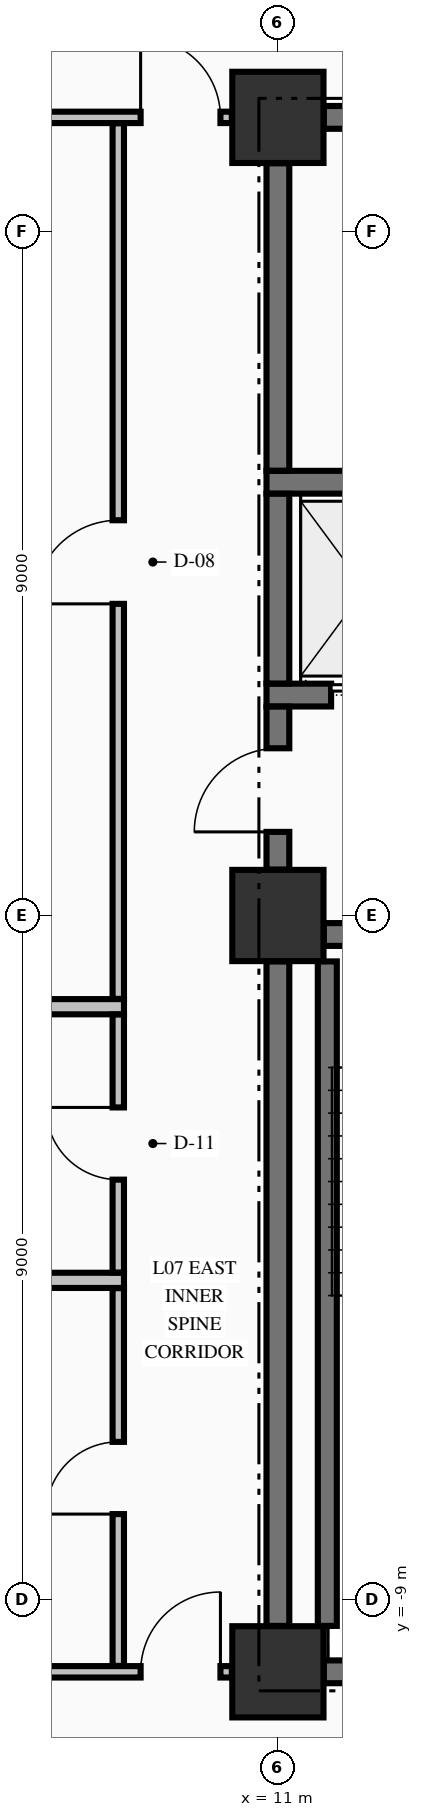
"""IFC4 building model, lengths in metres.
Left out: names, types, materials, properties, quantities, classifications, styles, units other than length and angle.
Written with IfcOpenShell. Run it as: python <this file> out.ifc"""

import sys

from ifc_helpers import new_model, si_unit, direction, frame, frame_2d, origin, origin_2d, place, context, subcontext, project, spatial, rectangle, extrude, element, fill, save


model = new_model("IFC4")
c1 = context("Model", 3, precision=1e-05, world=origin(), true_north=direction((0.0, 1.0)))
c2 = subcontext(c1, "Body", "Model", "MODEL_VIEW")
j1 = project(units=[si_unit("LENGTHUNIT", "METRE"), si_unit("PLANEANGLEUNIT", "RADIAN")], contexts=[c1])
p1 = place(None, origin())
s1 = spatial("IfcSite", under=j1, at=p1, CompositionType="ELEMENT")
p2 = place(p1, origin())
s2 = spatial("IfcBuilding", under=s1, at=p2, CompositionType="ELEMENT")
p3 = place(p2, frame((0.0, 0.0, 34.34)))
s3 = spatial("IfcBuildingStorey", under=s2, at=p3, CompositionType="ELEMENT", Elevation=34.34)
for number, where, z_axis, x_axis in (
    (1, (11.0, -9.95, -0.3), (0.0, 0.0, 1.0), (1.0, 0.0, 0.0)),
    (2, (11.0, 0.0, -0.3), (0.0, 0.0, 1.0), (1.0, 0.0, 0.0)),
    (3, (11.0, 10.5, -0.3), (0.0, 0.0, 1.0), (1.0, 0.0, 0.0)),
):
    element("IfcColumn", number, at=place(p3, frame(where, z_axis=z_axis, x_axis=x_axis)), inside=s3, PredefinedType="COLUMN", context=c2, shape_type="SweptSolid", body=[
        extrude(rectangle(XDim=1.2, YDim=1.2, at=origin_2d()), origin(), (0.0, 0.0, 1.0), 3.62),
    ])
p4 = place(p3, frame((11.604, -9.95, 0.0), z_axis=(0.0, 0.0, 1.0), x_axis=(1.0, 0.0, 0.0)))
e4 = element("IfcWall", 4, at=p4, inside=s3, PredefinedType="SHEAR", context=c2, shape_type="SweptSolid", body=[
    extrude(rectangle(XDim=3.096, YDim=0.3, at=frame_2d((1.548, 0.0))), origin(), (0.0, 0.0, 1.0), 3.32),
])
p5 = place(p3, frame((11.604, -0.25, 0.0), z_axis=(0.0, 0.0, 1.0), x_axis=(1.0, 0.0, 0.0)))
e5 = element("IfcWall", 5, at=p5, inside=s3, PredefinedType="SHEAR", context=c2, shape_type="SweptSolid", body=[
    extrude(rectangle(XDim=3.271, YDim=0.3, at=frame_2d((1.635, 0.0))), origin(), (0.0, 0.0, 1.0), 3.32),
])
p6 = place(p5, frame((0.996, 0.0, 0.0)))
e6 = element("IfcOpeningElement", 6, at=p6, cuts=e5, PredefinedType="OPENING", context=c2, shape_type="SweptSolid", body=[
    extrude(rectangle(XDim=1.1, YDim=2.15, at=frame_2d((0.55, 1.075))), frame((0.0, 0.16, 0.0), z_axis=(0.0, -1.0, 0.0), x_axis=(1.0, 0.0, 0.0)), (0.0, 0.0, 1.0), 0.32),
])
p7 = place(p3, frame((10.85, 2.9, 0.0), z_axis=(0.0, 0.0, 1.0), x_axis=(1.0, 0.0, 0.0)))
e7 = element("IfcWall", 7, at=p7, inside=s3, PredefinedType="SHEAR", context=c2, shape_type="SweptSolid", body=[
    extrude(rectangle(XDim=4.025, YDim=0.3, at=frame_2d((2.012, 0.0))), origin(), (0.0, 0.0, 1.0), 3.32),
])
p8 = place(p7, frame((0.85, 0.0, 0.0)))
e8 = element("IfcOpeningElement", 8, at=p8, cuts=e7, PredefinedType="OPENING", context=c2, shape_type="SweptSolid", body=[
    extrude(rectangle(XDim=1.1, YDim=2.2, at=frame_2d((0.55, 1.1))), frame((0.0, 0.16, 0.0), z_axis=(0.0, -1.0, 0.0), x_axis=(1.0, 0.0, 0.0)), (0.0, 0.0, 1.0), 0.32),
])
p9 = place(p3, frame((10.85, 5.7, 0.0), z_axis=(0.0, 0.0, 1.0), x_axis=(1.0, 0.0, 0.0)))
e9 = element("IfcWall", 9, at=p9, inside=s3, PredefinedType="SHEAR", context=c2, shape_type="SweptSolid", body=[
    extrude(rectangle(XDim=4.025, YDim=0.3, at=frame_2d((2.012, 0.0))), origin(), (0.0, 0.0, 1.0), 3.32),
])
p10 = place(p3, frame((11.604, 10.5, 0.0), z_axis=(0.0, 0.0, 1.0), x_axis=(1.0, 0.0, 0.0)))
e10 = element("IfcWall", 10, at=p10, inside=s3, PredefinedType="SHEAR", context=c2, shape_type="SweptSolid", body=[
    extrude(rectangle(XDim=3.096, YDim=0.3, at=frame_2d((1.548, 0.0))), origin(), (0.0, 0.0, 1.0), 3.32),
])
p11 = place(p10, frame((1.371, 0.0, 0.0)))
e11 = element("IfcOpeningElement", 11, at=p11, cuts=e10, PredefinedType="OPENING", context=c2, shape_type="SweptSolid", body=[
    extrude(rectangle(XDim=0.95, YDim=2.15, at=frame_2d((0.475, 1.075))), frame((0.0, 0.16, 0.0), z_axis=(0.0, -1.0, 0.0), x_axis=(1.0, 0.0, 0.0)), (0.0, 0.0, 1.0), 0.32),
])
p12 = place(p3, frame((-10.394, -9.95, 0.0), z_axis=(0.0, 0.0, 1.0), x_axis=(1.0, 0.0, 0.0)))
e12 = element("IfcWall", 12, at=p12, inside=s3, PredefinedType="PARTITIONING", context=c2, shape_type="SweptSolid", body=[
    extrude(rectangle(XDim=20.788, YDim=0.15, at=frame_2d((10.394, 0.0))), origin(), (0.0, 0.0, 1.0), 3.32),
])
p13 = place(p12, frame((0.15, 0.0, 0.0)))
e13 = element("IfcOpeningElement", 13, at=p13, cuts=e12, PredefinedType="OPENING", context=c2, shape_type="SweptSolid", body=[
    extrude(rectangle(XDim=1.05, YDim=2.15, at=frame_2d((0.525, 1.075))), frame((0.0, 0.085, 0.0), z_axis=(0.0, -1.0, 0.0), x_axis=(1.0, 0.0, 0.0)), (0.0, 0.0, 1.0), 0.17),
])
p14 = place(p12, frame((19.588, 0.0, 0.0)))
e14 = element("IfcOpeningElement", 14, at=p14, cuts=e12, PredefinedType="OPENING", context=c2, shape_type="SweptSolid", body=[
    extrude(rectangle(XDim=1.05, YDim=2.15, at=frame_2d((0.525, 1.075))), frame((0.0, 0.085, 0.0), z_axis=(0.0, -1.0, 0.0), x_axis=(1.0, 0.0, 0.0)), (0.0, 0.0, 1.0), 0.17),
])
p15 = place(p12, frame((11.969, 0.0, 0.0)))
e15 = element("IfcOpeningElement", 15, at=p15, cuts=e12, PredefinedType="OPENING", context=c2, shape_type="SweptSolid", body=[
    extrude(rectangle(XDim=0.95, YDim=2.15, at=frame_2d((0.475, 1.075))), frame((0.0, 0.085, 0.0), z_axis=(0.0, -1.0, 0.0), x_axis=(1.0, 0.0, 0.0)), (0.0, 0.0, 1.0), 0.17),
])
for number, where, z_axis, x_axis in (
    (16, (-1.9, -4.8, 0.0), (0.0, 0.0, 1.0), (1.0, 0.0, 0.0)),
    (17, (-1.9, -1.2, 0.0), (0.0, 0.0, 1.0), (1.0, 0.0, 0.0)),
):
    element("IfcWall", number, at=place(p3, frame(where, z_axis=z_axis, x_axis=x_axis)), inside=s3, PredefinedType="PARTITIONING", context=c2, shape_type="SweptSolid", body=[
        extrude(rectangle(XDim=10.875, YDim=0.2, at=frame_2d((5.438, 0.0))), origin(), (0.0, 0.0, 1.0), 3.32),
    ])
p16 = place(p3, frame((-10.394, 10.5, 0.0), z_axis=(0.0, 0.0, 1.0), x_axis=(1.0, 0.0, 0.0)))
e18 = element("IfcWall", 18, at=p16, inside=s3, PredefinedType="PARTITIONING", context=c2, shape_type="SweptSolid", body=[
    extrude(rectangle(XDim=20.788, YDim=0.15, at=frame_2d((10.394, 0.0))), origin(), (0.0, 0.0, 1.0), 3.32),
])
p17 = place(p16, frame((0.15, 0.0, 0.0)))
e19 = element("IfcOpeningElement", 19, at=p17, cuts=e18, PredefinedType="OPENING", context=c2, shape_type="SweptSolid", body=[
    extrude(rectangle(XDim=1.05, YDim=2.15, at=frame_2d((0.525, 1.075))), frame((0.0, 0.085, 0.0), z_axis=(0.0, -1.0, 0.0), x_axis=(1.0, 0.0, 0.0)), (0.0, 0.0, 1.0), 0.17),
])
p18 = place(p16, frame((19.588, 0.0, 0.0)))
e20 = element("IfcOpeningElement", 20, at=p18, cuts=e18, PredefinedType="OPENING", context=c2, shape_type="SweptSolid", body=[
    extrude(rectangle(XDim=1.05, YDim=2.15, at=frame_2d((0.525, 1.075))), frame((0.0, 0.085, 0.0), z_axis=(0.0, -1.0, 0.0), x_axis=(1.0, 0.0, 0.0)), (0.0, 0.0, 1.0), 0.17),
])
p19 = place(p3, frame((11.0, -9.346, 0.0), z_axis=(0.0, 0.0, 1.0), x_axis=(0.0, 1.0, 0.0)))
e21 = element("IfcWall", 21, at=p19, inside=s3, PredefinedType="SHEAR", context=c2, shape_type="SweptSolid", body=[
    extrude(rectangle(XDim=8.742, YDim=0.3, at=frame_2d((4.371, 0.0))), origin(), (0.0, 0.0, 1.0), 3.32),
])
p20 = place(p3, frame((11.0, 0.604, 0.0), z_axis=(0.0, 0.0, 1.0), x_axis=(0.0, 1.0, 0.0)))
e22 = element("IfcWall", 22, at=p20, inside=s3, PredefinedType="SHEAR", context=c2, shape_type="SweptSolid", body=[
    extrude(rectangle(XDim=2.144, YDim=0.3, at=frame_2d((1.072, 0.0))), origin(), (0.0, 0.0, 1.0), 3.32),
])
p21 = place(p20, frame((0.496, 0.0, 0.0)))
e23 = element("IfcOpeningElement", 23, at=p21, cuts=e22, PredefinedType="OPENING", context=c2, shape_type="SweptSolid", body=[
    extrude(rectangle(XDim=1.1, YDim=2.15, at=frame_2d((0.55, 1.075))), frame((0.0, 0.16, 0.0), z_axis=(0.0, -1.0, 0.0), x_axis=(1.0, 0.0, 0.0)), (0.0, 0.0, 1.0), 0.32),
])
p22 = place(p3, frame((11.0, 3.052, 0.0), z_axis=(0.0, 0.0, 1.0), x_axis=(0.0, 1.0, 0.0)))
e24 = element("IfcWall", 24, at=p22, inside=s3, PredefinedType="SHEAR", context=c2, shape_type="SweptSolid", body=[
    extrude(rectangle(XDim=2.496, YDim=0.3, at=frame_2d((1.248, 0.0))), origin(), (0.0, 0.0, 1.0), 3.32),
])
p23 = place(p3, frame((11.0, 5.852, 0.0), z_axis=(0.0, 0.0, 1.0), x_axis=(0.0, 1.0, 0.0)))
e25 = element("IfcWall", 25, at=p23, inside=s3, PredefinedType="SHEAR", context=c2, shape_type="SweptSolid", body=[
    extrude(rectangle(XDim=4.044, YDim=0.3, at=frame_2d((2.022, 0.0))), origin(), (0.0, 0.0, 1.0), 3.32),
])
p24 = place(p3, frame((11.65, -9.346, 0.0), z_axis=(0.0, 0.0, 1.0), x_axis=(0.0, 1.0, 0.0)))
e26 = element("IfcWall", 26, at=p24, inside=s3, PredefinedType="SOLIDWALL", context=c2, shape_type="SweptSolid", body=[
    extrude(rectangle(XDim=8.742, YDim=0.25, at=frame_2d((4.371, 0.0))), origin(), (0.0, 0.0, 1.0), 3.32),
])
p25 = place(p3, frame((8.9, -9.872, 0.0), z_axis=(0.0, 0.0, 1.0), x_axis=(0.0, 1.0, 0.0)))
e27 = element("IfcWall", 27, at=p25, inside=s3, PredefinedType="PARTITIONING", context=c2, shape_type="SweptSolid", body=[
    extrude(rectangle(XDim=4.969, YDim=0.15, at=frame_2d((2.484, 0.0))), origin(), (0.0, 0.0, 1.0), 3.32),
])
p26 = place(p25, frame((1.997, 0.0, 0.0)))
e28 = element("IfcOpeningElement", 28, at=p26, cuts=e27, PredefinedType="OPENING", context=c2, shape_type="SweptSolid", body=[
    extrude(rectangle(XDim=0.95, YDim=2.15, at=frame_2d((0.475, 1.075))), frame((0.0, 0.085, 0.0), z_axis=(0.0, -1.0, 0.0), x_axis=(1.0, 0.0, 0.0)), (0.0, 0.0, 1.0), 0.17),
])
p27 = place(p3, frame((8.9, -4.697, 0.0), z_axis=(0.0, 0.0, 1.0), x_axis=(0.0, 1.0, 0.0)))
e29 = element("IfcWall", 29, at=p27, inside=s3, PredefinedType="PARTITIONING", context=c2, shape_type="SweptSolid", body=[
    extrude(rectangle(XDim=3.394, YDim=0.15, at=frame_2d((1.697, 0.0))), origin(), (0.0, 0.0, 1.0), 3.32),
])
p28 = place(p27, frame((1.222, 0.0, 0.0)))
e30 = element("IfcOpeningElement", 30, at=p28, cuts=e29, PredefinedType="OPENING", context=c2, shape_type="SweptSolid", body=[
    extrude(rectangle(XDim=0.95, YDim=2.15, at=frame_2d((0.475, 1.075))), frame((0.0, 0.085, 0.0), z_axis=(0.0, -1.0, 0.0), x_axis=(1.0, 0.0, 0.0)), (0.0, 0.0, 1.0), 0.17),
])
p29 = place(p3, frame((8.9, -1.097, 0.0), z_axis=(0.0, 0.0, 1.0), x_axis=(0.0, 1.0, 0.0)))
e31 = element("IfcWall", 31, at=p29, inside=s3, PredefinedType="PARTITIONING", context=c2, shape_type="SweptSolid", body=[
    extrude(rectangle(XDim=11.519, YDim=0.15, at=frame_2d((5.76, 0.0))), origin(), (0.0, 0.0, 1.0), 3.32),
])
p30 = place(p29, frame((5.197, 0.0, 0.0)))
e32 = element("IfcOpeningElement", 32, at=p30, cuts=e31, PredefinedType="OPENING", context=c2, shape_type="SweptSolid", body=[
    extrude(rectangle(XDim=1.1, YDim=2.15, at=frame_2d((0.55, 1.075))), frame((0.0, 0.085, 0.0), z_axis=(0.0, -1.0, 0.0), x_axis=(1.0, 0.0, 0.0)), (0.0, 0.0, 1.0), 0.17),
])
p31 = place(p21, origin())
e33 = element("IfcDoor", 33, at=p31, inside=s3, OperationType="SINGLE_SWING_LEFT", PredefinedType="DOOR", context=c2, shape_type="SweptSolid", body=[
    extrude(rectangle(XDim=1.1, YDim=2.15, at=frame_2d((0.55, 1.075))), frame((0.0, 0.025, 0.0), z_axis=(0.0, -1.0, 0.0), x_axis=(1.0, 0.0, 0.0)), (0.0, 0.0, 1.0), 0.05),
])
fill(e23, e33)
p32 = place(p8, origin())
e34 = element("IfcDoor", 34, at=p32, inside=s3, OperationType="SLIDING_TO_RIGHT", PredefinedType="DOOR", context=c2, shape_type="SweptSolid", body=[
    extrude(rectangle(XDim=1.1, YDim=2.2, at=frame_2d((0.55, 1.1))), frame((0.0, 0.025, 0.0), z_axis=(0.0, -1.0, 0.0), x_axis=(1.0, 0.0, 0.0)), (0.0, 0.0, 1.0), 0.05),
])
fill(e8, e34)
p33 = place(p18, origin())
e35 = element("IfcDoor", 35, at=p33, inside=s3, OperationType="SINGLE_SWING_LEFT", PredefinedType="DOOR", context=c2, shape_type="SweptSolid", body=[
    extrude(rectangle(XDim=1.05, YDim=2.15, at=frame_2d((0.525, 1.075))), frame((0.0, 0.025, 0.0), z_axis=(0.0, -1.0, 0.0), x_axis=(1.0, 0.0, 0.0)), (0.0, 0.0, 1.0), 0.05),
])
fill(e20, e35)
p34 = place(p14, origin())
e36 = element("IfcDoor", 36, at=p34, inside=s3, OperationType="SINGLE_SWING_RIGHT", PredefinedType="DOOR", context=c2, shape_type="SweptSolid", body=[
    extrude(rectangle(XDim=1.05, YDim=2.15, at=frame_2d((0.525, 1.075))), frame((0.0, 0.025, 0.0), z_axis=(0.0, -1.0, 0.0), x_axis=(1.0, 0.0, 0.0)), (0.0, 0.0, 1.0), 0.05),
])
fill(e14, e36)
p35 = place(p30, origin())
e37 = element("IfcDoor", 37, at=p35, inside=s3, OperationType="SINGLE_SWING_LEFT", PredefinedType="DOOR", context=c2, shape_type="SweptSolid", body=[
    extrude(rectangle(XDim=1.1, YDim=2.15, at=frame_2d((0.55, 1.075))), frame((0.0, 0.025, 0.0), z_axis=(0.0, -1.0, 0.0), x_axis=(1.0, 0.0, 0.0)), (0.0, 0.0, 1.0), 0.05),
])
fill(e32, e37)
p36 = place(p28, origin())
e38 = element("IfcDoor", 38, at=p36, inside=s3, OperationType="SINGLE_SWING_RIGHT", PredefinedType="DOOR", context=c2, shape_type="SweptSolid", body=[
    extrude(rectangle(XDim=0.95, YDim=2.15, at=frame_2d((0.475, 1.075))), frame((0.0, 0.025, 0.0), z_axis=(0.0, -1.0, 0.0), x_axis=(1.0, 0.0, 0.0)), (0.0, 0.0, 1.0), 0.05),
])
fill(e30, e38)
p37 = place(p26, origin())
e39 = element("IfcDoor", 39, at=p37, inside=s3, OperationType="SINGLE_SWING_LEFT", PredefinedType="DOOR", context=c2, shape_type="SweptSolid", body=[
    extrude(rectangle(XDim=0.95, YDim=2.15, at=frame_2d((0.475, 1.075))), frame((0.0, 0.025, 0.0), z_axis=(0.0, -1.0, 0.0), x_axis=(1.0, 0.0, 0.0)), (0.0, 0.0, 1.0), 0.05),
])
fill(e28, e39)
save(model, sys.argv[1])
